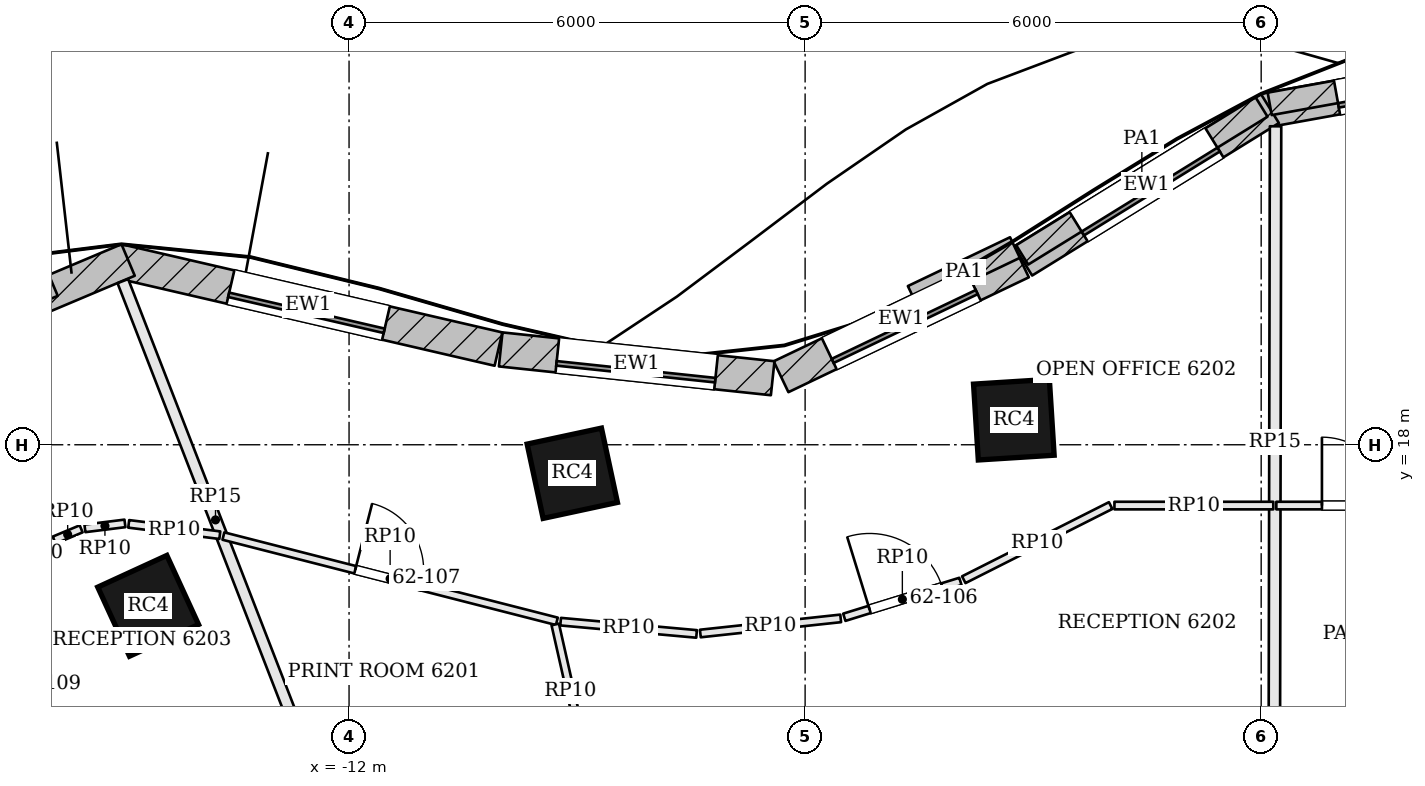
"""IFC4 building model, lengths in metres.
Left out: names, types, materials, properties, quantities, classifications, styles, units other than length and angle.
Written with IfcOpenShell. Run it as: python <this file> out.ifc"""

import sys

from ifc_helpers import new_model, si_unit, direction, frame, frame_2d, origin, origin_2d, place, context, subcontext, project, spatial, rectangle, extrude, element, fill, save


model = new_model("IFC4")
c1 = context("Model", 3, precision=1e-05, world=origin(), true_north=direction((0.0, 1.0)))
c2 = subcontext(c1, "Body", "Model", "MODEL_VIEW")
j1 = project(units=[si_unit("LENGTHUNIT", "METRE"), si_unit("PLANEANGLEUNIT", "RADIAN")], contexts=[c1])
p1 = place(None, origin())
s1 = spatial("IfcSite", under=j1, at=p1, CompositionType="ELEMENT")
p2 = place(p1, origin())
s2 = spatial("IfcBuilding", under=s1, at=p2, CompositionType="ELEMENT")
p3 = place(p2, frame((0.0, 0.0, 252.6)))
s3 = spatial("IfcBuildingStorey", under=s2, at=p3, CompositionType="ELEMENT", Elevation=252.6)
for number, where, z_axis, x_axis in (
    (1, (-3.254, 18.33, 0.0), (0.0, 0.0, 1.0), (-0.998, -0.063, 0.0)),
    (2, (-9.063, 17.625, 0.0), (0.0, 0.0, 1.0), (-0.978, -0.21, 0.0)),
    (3, (-14.643, 15.881, 0.0), (0.0, 0.0, 1.0), (-0.909, -0.417, 0.0)),
):
    element("IfcColumn", number, at=place(p3, frame(where, z_axis=z_axis, x_axis=x_axis)), inside=s3, PredefinedType="COLUMN", context=c2, shape_type="SweptSolid", body=[
        extrude(rectangle(XDim=1.0, YDim=1.0, at=origin_2d()), origin(), (0.0, 0.0, 1.0), 3.9),
    ])
p4 = place(p3, frame((3.727, 23.061, 0.0), z_axis=(0.0, 0.0, 1.0), x_axis=(-0.984119180424, -0.177508982087, 0.0)))
e4 = element("IfcWall", 4, at=p4, inside=s3, PredefinedType="SOLIDWALL", context=c2, shape_type="SweptSolid", body=[
    extrude(rectangle(XDim=3.747, YDim=0.45, at=frame_2d((1.873, 0.0))), origin(), (0.0, 0.0, 1.0), 3.7),
])
p5 = place(p4, frame((0.973, 0.0, 0.9)))
e5 = element("IfcOpeningElement", 5, at=p5, cuts=e4, PredefinedType="OPENING", context=c2, shape_type="SweptSolid", body=[
    extrude(rectangle(XDim=1.8, YDim=2.3, at=frame_2d((0.9, 1.15))), frame((0.0, 0.235, 0.0), z_axis=(0.0, -1.0, 0.0), x_axis=(1.0, 0.0, 0.0)), (0.0, 0.0, 1.0), 0.47),
])
p6 = place(p3, frame((0.115, 22.424, 0.0), z_axis=(0.0, 0.0, 1.0), x_axis=(-0.8506970368, -0.525656305564, 0.0)))
e6 = element("IfcWall", 6, at=p6, inside=s3, PredefinedType="SOLIDWALL", context=c2, shape_type="SweptSolid", body=[
    extrude(rectangle(XDim=3.816, YDim=0.45, at=frame_2d((1.908, 0.0))), origin(), (0.0, 0.0, 1.0), 3.7),
])
p7 = place(p6, frame((0.858, 0.0, 0.9)))
e7 = element("IfcOpeningElement", 7, at=p7, cuts=e6, PredefinedType="OPENING", context=c2, shape_type="SweptSolid", body=[
    extrude(rectangle(XDim=2.1, YDim=2.3, at=frame_2d((1.05, 1.15))), frame((0.0, 0.235, 0.0), z_axis=(0.0, -1.0, 0.0), x_axis=(1.0, 0.0, 0.0)), (0.0, 0.0, 1.0), 0.47),
])
p8 = place(p3, frame((-3.154, 20.406, 0.0), z_axis=(0.0, 0.0, 1.0), x_axis=(-0.902333313, -0.431038968367, 0.0)))
e8 = element("IfcWall", 8, at=p8, inside=s3, PredefinedType="SOLIDWALL", context=c2, shape_type="SweptSolid", body=[
    extrude(rectangle(XDim=3.505, YDim=0.45, at=frame_2d((1.753, 0.0))), origin(), (0.0, 0.0, 1.0), 3.7),
])
p9 = place(p8, frame((0.703, 0.0, 0.9)))
e9 = element("IfcOpeningElement", 9, at=p9, cuts=e8, PredefinedType="OPENING", context=c2, shape_type="SweptSolid", body=[
    extrude(rectangle(XDim=2.1, YDim=2.3, at=frame_2d((1.05, 1.15))), frame((0.0, 0.235, 0.0), z_axis=(0.0, -1.0, 0.0), x_axis=(1.0, 0.0, 0.0)), (0.0, 0.0, 1.0), 0.47),
])
p10 = place(p3, frame((-6.427, 18.875, 0.0), z_axis=(0.0, 0.0, 1.0), x_axis=(-0.994433468803, 0.10536638992, 0.0)))
e10 = element("IfcWall", 10, at=p10, inside=s3, PredefinedType="SOLIDWALL", context=c2, shape_type="SweptSolid", body=[
    extrude(rectangle(XDim=3.598, YDim=0.45, at=frame_2d((1.799, 0.0))), origin(), (0.0, 0.0, 1.0), 3.7),
])
p11 = place(p10, frame((0.749, 0.0, 0.9)))
e11 = element("IfcOpeningElement", 11, at=p11, cuts=e10, PredefinedType="OPENING", context=c2, shape_type="SweptSolid", body=[
    extrude(rectangle(XDim=2.1, YDim=2.3, at=frame_2d((1.05, 1.15))), frame((0.0, 0.235, 0.0), z_axis=(0.0, -1.0, 0.0), x_axis=(1.0, 0.0, 0.0)), (0.0, 0.0, 1.0), 0.47),
])
p12 = place(p3, frame((-10.034, 19.259, 0.0), z_axis=(0.0, 0.0, 1.0), x_axis=(-0.974223567844, 0.225584662283, 0.0)))
e12 = element("IfcWall", 12, at=p12, inside=s3, PredefinedType="SOLIDWALL", context=c2, shape_type="SweptSolid", body=[
    extrude(rectangle(XDim=5.139, YDim=0.45, at=frame_2d((2.569, 0.0))), origin(), (0.0, 0.0, 1.0), 3.7),
])
p13 = place(p12, frame((1.519, 0.0, 0.9)))
e13 = element("IfcOpeningElement", 13, at=p13, cuts=e12, PredefinedType="OPENING", context=c2, shape_type="SweptSolid", body=[
    extrude(rectangle(XDim=2.1, YDim=2.3, at=frame_2d((1.05, 1.15))), frame((0.0, 0.235, 0.0), z_axis=(0.0, -1.0, 0.0), x_axis=(1.0, 0.0, 0.0)), (0.0, 0.0, 1.0), 0.47),
])
p14 = place(p3, frame((-14.906, 20.431, 0.0), z_axis=(0.0, 0.0, 1.0), x_axis=(-0.921435803521, -0.388530642279, 0.0)))
e14 = element("IfcWall", 14, at=p14, inside=s3, PredefinedType="SOLIDWALL", context=c2, shape_type="SweptSolid", body=[
    extrude(rectangle(XDim=4.309, YDim=0.45, at=frame_2d((2.154, 0.0))), origin(), (0.0, 0.0, 1.0), 3.7),
])
p15 = place(p14, frame((1.254, 0.0, 0.9)))
e15 = element("IfcOpeningElement", 15, at=p15, cuts=e14, PredefinedType="OPENING", context=c2, shape_type="SweptSolid", body=[
    extrude(rectangle(XDim=1.8, YDim=2.3, at=frame_2d((0.9, 1.15))), frame((0.0, 0.235, 0.0), z_axis=(0.0, -1.0, 0.0), x_axis=(1.0, 0.0, 0.0)), (0.0, 0.0, 1.0), 0.47),
])
p16 = place(p3, frame((3.59, 23.112, 3.9), z_axis=(0.0, 0.0, 1.0), x_axis=(-0.984124248147, -0.177480884064, 0.0)))
e16 = element("IfcWall", 16, at=p16, inside=s3, PredefinedType="PARAPET", context=c2, shape_type="SweptSolid", body=[
    extrude(rectangle(XDim=3.534, YDim=0.3, at=frame_2d((1.767, 0.0))), origin(), (0.0, 0.0, 1.0), 1.1),
])
p17 = place(p3, frame((0.005, 22.444, 3.9), z_axis=(0.0, 0.0, 1.0), x_axis=(-0.850710394144, -0.525634688063, 0.0)))
e17 = element("IfcWall", 17, at=p17, inside=s3, PredefinedType="PARAPET", context=c2, shape_type="SweptSolid", body=[
    extrude(rectangle(XDim=3.702, YDim=0.3, at=frame_2d((1.851, 0.0))), origin(), (0.0, 0.0, 1.0), 1.1),
])
p18 = place(p3, frame((-3.239, 20.594, 3.9), z_axis=(0.0, 0.0, 1.0), x_axis=(-0.902344893923, -0.431014724123, 0.0)))
e18 = element("IfcWall", 18, at=p18, inside=s3, PredefinedType="PARAPET", context=c2, shape_type="SweptSolid", body=[
    extrude(rectangle(XDim=1.49, YDim=0.3, at=frame_2d((0.745, 0.0))), origin(), (0.0, 0.0, 1.0), 1.1),
])
p19 = place(p3, frame((-15.891, 20.097, 3.9), z_axis=(0.0, 0.0, 1.0), x_axis=(-0.921468908678, -0.388452121038, 0.0)))
e19 = element("IfcWall", 19, at=p19, inside=s3, PredefinedType="PARAPET", context=c2, shape_type="SweptSolid", body=[
    extrude(rectangle(XDim=2.099, YDim=0.3, at=frame_2d((1.05, 0.0))), origin(), (0.0, 0.0, 1.0), 1.1),
])
p20 = place(p3, frame((0.189, 22.19, 0.0), z_axis=(0.0, 0.0, 1.0), x_axis=(-0.001967286324, -0.99999806489, 0.0)))
e20 = element("IfcWall", 20, at=p20, inside=s3, PredefinedType="PARTITIONING", context=c2, shape_type="SweptSolid", body=[
    extrude(rectangle(XDim=8.315, YDim=0.15, at=frame_2d((4.157, 0.0))), origin(), (0.0, 0.0, 1.0), 3.084),
])
p21 = place(p3, frame((-14.976, 20.153, 0.0), z_axis=(0.0, 0.0, 1.0), x_axis=(0.361720652029, -0.932286527788, 0.0)))
e21 = element("IfcWall", 21, at=p21, inside=s3, PredefinedType="PARTITIONING", context=c2, shape_type="SweptSolid", body=[
    extrude(rectangle(XDim=6.739, YDim=0.15, at=frame_2d((3.37, 0.0))), origin(), (0.0, 0.0, 1.0), 3.084),
])
p22 = place(p3, frame((0.199, 17.2, 0.0), z_axis=(0.0, 0.0, 1.0), x_axis=(1.0, 0.0, 0.0)))
e22 = element("IfcWall", 22, at=p22, inside=s3, PredefinedType="PARTITIONING", context=c2, shape_type="SweptSolid", body=[
    extrude(rectangle(XDim=6.586, YDim=0.1, at=frame_2d((3.293, 0.0))), origin(), (0.0, 0.0, 1.0), 3.084),
])
p23 = place(p22, frame((0.6, 0.0, 0.0)))
e23 = element("IfcOpeningElement", 23, at=p23, cuts=e22, PredefinedType="OPENING", context=c2, shape_type="SweptSolid", body=[
    extrude(rectangle(XDim=0.9, YDim=2.1, at=frame_2d((0.45, 1.05))), frame((0.0, 0.06, 0.0), z_axis=(0.0, -1.0, 0.0), x_axis=(1.0, 0.0, 0.0)), (0.0, 0.0, 1.0), 0.12),
])
p24 = place(p3, frame((-13.653, 16.799, 0.0), z_axis=(0.0, 0.0, 1.0), x_axis=(0.968837918763, -0.247695553386, 0.0)))
e24 = element("IfcWall", 24, at=p24, inside=s3, PredefinedType="PARTITIONING", context=c2, shape_type="SweptSolid", body=[
    extrude(rectangle(XDim=4.528, YDim=0.1, at=frame_2d((2.264, 0.0))), origin(), (0.0, 0.0, 1.0), 3.084),
])
p25 = place(p24, frame((1.79, 0.0, 0.0)))
e25 = element("IfcOpeningElement", 25, at=p25, cuts=e24, PredefinedType="OPENING", context=c2, shape_type="SweptSolid", body=[
    extrude(rectangle(XDim=0.9, YDim=2.1, at=frame_2d((0.45, 1.05))), frame((0.0, 0.06, 0.0), z_axis=(0.0, -1.0, 0.0), x_axis=(1.0, 0.0, 0.0)), (0.0, 0.0, 1.0), 0.12),
])
p26 = place(p3, frame((-9.216, 15.673, 0.0), z_axis=(0.0, 0.0, 1.0), x_axis=(0.995953168248, -0.089873726172, 0.0)))
e26 = element("IfcWall", 26, at=p26, inside=s3, PredefinedType="PARTITIONING", context=c2, shape_type="SweptSolid", body=[
    extrude(rectangle(XDim=1.796, YDim=0.1, at=frame_2d((0.898, 0.0))), origin(), (0.0, 0.0, 1.0), 3.084),
])
p27 = place(p3, frame((-7.378, 15.517, 0.0), z_axis=(0.0, 0.0, 1.0), x_axis=(0.994229805258, 0.107271125359, 0.0)))
e27 = element("IfcWall", 27, at=p27, inside=s3, PredefinedType="PARTITIONING", context=c2, shape_type="SweptSolid", body=[
    extrude(rectangle(XDim=1.857, YDim=0.1, at=frame_2d((0.929, 0.0))), origin(), (0.0, 0.0, 1.0), 3.084),
])
p28 = place(p3, frame((-5.484, 15.73, 0.0), z_axis=(0.0, 0.0, 1.0), x_axis=(0.955448083824, 0.295159209778, 0.0)))
e28 = element("IfcWall", 28, at=p28, inside=s3, PredefinedType="PARTITIONING", context=c2, shape_type="SweptSolid", body=[
    extrude(rectangle(XDim=1.598, YDim=0.1, at=frame_2d((0.799, 0.0))), origin(), (0.0, 0.0, 1.0), 3.084),
])
p29 = place(p28, frame((0.348, 0.0, 0.0)))
e29 = element("IfcOpeningElement", 29, at=p29, cuts=e28, PredefinedType="OPENING", context=c2, shape_type="SweptSolid", body=[
    extrude(rectangle(XDim=1.0, YDim=2.1, at=frame_2d((0.5, 1.05))), frame((0.0, 0.06, 0.0), z_axis=(0.0, -1.0, 0.0), x_axis=(1.0, 0.0, 0.0)), (0.0, 0.0, 1.0), 0.12),
])
p30 = place(p3, frame((-3.913, 16.225, 0.0), z_axis=(0.0, 0.0, 1.0), x_axis=(0.892706044325, 0.450639455026, 0.0)))
e30 = element("IfcWall", 30, at=p30, inside=s3, PredefinedType="PARTITIONING", context=c2, shape_type="SweptSolid", body=[
    extrude(rectangle(XDim=2.164, YDim=0.1, at=frame_2d((1.082, 0.0))), origin(), (0.0, 0.0, 1.0), 3.084),
])
p31 = place(p3, frame((-1.93, 17.2, 0.0), z_axis=(0.0, 0.0, 1.0), x_axis=(1.0, 0.0, 0.0)))
e31 = element("IfcWall", 31, at=p31, inside=s3, PredefinedType="PARTITIONING", context=c2, shape_type="SweptSolid", body=[
    extrude(rectangle(XDim=2.09, YDim=0.1, at=frame_2d((1.045, 0.0))), origin(), (0.0, 0.0, 1.0), 3.084),
])
p32 = place(p3, frame((-8.889, 13.873, 0.0), z_axis=(0.0, 0.0, 1.0), x_axis=(-0.22037699084, 0.975414774293, 0.0)))
e32 = element("IfcWall", 32, at=p32, inside=s3, PredefinedType="PARTITIONING", context=c2, shape_type="SweptSolid", body=[
    extrude(rectangle(XDim=1.807, YDim=0.1, at=frame_2d((0.903, 0.0))), origin(), (0.0, 0.0, 1.0), 3.084),
])
p33 = place(p3, frame((-16.3, 16.424, 0.0), z_axis=(0.0, 0.0, 1.0), x_axis=(0.777836101026, 0.628467182867, 0.0)))
e33 = element("IfcWall", 33, at=p33, inside=s3, PredefinedType="PARTITIONING", context=c2, shape_type="SweptSolid", body=[
    extrude(rectangle(XDim=0.48, YDim=0.1, at=frame_2d((0.24, 0.0))), origin(), (0.0, 0.0, 1.0), 3.084),
])
p34 = place(p3, frame((-15.879, 16.746, 0.0), z_axis=(0.0, 0.0, 1.0), x_axis=(0.922945318828, 0.384931082732, 0.0)))
e34 = element("IfcWall", 34, at=p34, inside=s3, PredefinedType="PARTITIONING", context=c2, shape_type="SweptSolid", body=[
    extrude(rectangle(XDim=0.384, YDim=0.1, at=frame_2d((0.192, 0.0))), origin(), (0.0, 0.0, 1.0), 3.084),
])
p35 = place(p3, frame((-15.475, 16.9, 0.0), z_axis=(0.0, 0.0, 1.0), x_axis=(0.992369617548, 0.123298589477, 0.0)))
e35 = element("IfcWall", 35, at=p35, inside=s3, PredefinedType="PARTITIONING", context=c2, shape_type="SweptSolid", body=[
    extrude(rectangle(XDim=0.531, YDim=0.1, at=frame_2d((0.265, 0.0))), origin(), (0.0, 0.0, 1.0), 3.084),
])
p36 = place(p3, frame((-14.899, 16.959, 0.0), z_axis=(0.0, 0.0, 1.0), x_axis=(0.992389459051, -0.123138789846, 0.0)))
e36 = element("IfcWall", 36, at=p36, inside=s3, PredefinedType="PARTITIONING", context=c2, shape_type="SweptSolid", body=[
    extrude(rectangle(XDim=1.208, YDim=0.1, at=frame_2d((0.604, 0.0))), origin(), (0.0, 0.0, 1.0), 3.084),
])
p37 = place(p3, frame((-14.837, 11.988, 0.0), z_axis=(0.0, 0.0, 1.0), x_axis=(-0.495920621108, 0.868367858433, 0.0)))
e37 = element("IfcWall", 37, at=p37, inside=s3, PredefinedType="PARTITIONING", context=c2, shape_type="SweptSolid", body=[
    extrude(rectangle(XDim=4.095, YDim=0.1, at=frame_2d((2.047, 0.0))), origin(), (0.0, 0.0, 1.0), 3.084),
])
p38 = place(p37, frame((2.8, 0.0, 0.0)))
e38 = element("IfcOpeningElement", 38, at=p38, cuts=e37, PredefinedType="OPENING", context=c2, shape_type="SweptSolid", body=[
    extrude(rectangle(XDim=1.0, YDim=2.4, at=frame_2d((0.5, 1.2))), frame((0.0, 0.06, 0.0), z_axis=(0.0, -1.0, 0.0), x_axis=(1.0, 0.0, 0.0)), (0.0, 0.0, 1.0), 0.12),
])
p39 = place(p5, origin())
e39 = element("IfcWindow", 39, at=p39, inside=s3, PartitioningType="SINGLE_PANEL", PredefinedType="WINDOW", context=c2, shape_type="SweptSolid", body=[
    extrude(rectangle(XDim=1.8, YDim=2.3, at=frame_2d((0.9, 1.15))), frame((0.0, 0.135, 0.0), z_axis=(0.0, -1.0, 0.0), x_axis=(1.0, 0.0, 0.0)), (0.0, 0.0, 1.0), 0.06),
])
fill(e5, e39)
p40 = place(p7, origin())
e40 = element("IfcWindow", 40, at=p40, inside=s3, PartitioningType="SINGLE_PANEL", PredefinedType="WINDOW", context=c2, shape_type="SweptSolid", body=[
    extrude(rectangle(XDim=2.1, YDim=2.3, at=frame_2d((1.05, 1.15))), frame((0.0, 0.135, 0.0), z_axis=(0.0, -1.0, 0.0), x_axis=(1.0, 0.0, 0.0)), (0.0, 0.0, 1.0), 0.06),
])
fill(e7, e40)
p41 = place(p9, origin())
e41 = element("IfcWindow", 41, at=p41, inside=s3, PartitioningType="SINGLE_PANEL", PredefinedType="WINDOW", context=c2, shape_type="SweptSolid", body=[
    extrude(rectangle(XDim=2.1, YDim=2.3, at=frame_2d((1.05, 1.15))), frame((0.0, 0.135, 0.0), z_axis=(0.0, -1.0, 0.0), x_axis=(1.0, 0.0, 0.0)), (0.0, 0.0, 1.0), 0.06),
])
fill(e9, e41)
p42 = place(p11, origin())
e42 = element("IfcWindow", 42, at=p42, inside=s3, PartitioningType="SINGLE_PANEL", PredefinedType="WINDOW", context=c2, shape_type="SweptSolid", body=[
    extrude(rectangle(XDim=2.1, YDim=2.3, at=frame_2d((1.05, 1.15))), frame((0.0, 0.135, 0.0), z_axis=(0.0, -1.0, 0.0), x_axis=(1.0, 0.0, 0.0)), (0.0, 0.0, 1.0), 0.06),
])
fill(e11, e42)
p43 = place(p13, origin())
e43 = element("IfcWindow", 43, at=p43, inside=s3, PartitioningType="SINGLE_PANEL", PredefinedType="WINDOW", context=c2, shape_type="SweptSolid", body=[
    extrude(rectangle(XDim=2.1, YDim=2.3, at=frame_2d((1.05, 1.15))), frame((0.0, 0.135, 0.0), z_axis=(0.0, -1.0, 0.0), x_axis=(1.0, 0.0, 0.0)), (0.0, 0.0, 1.0), 0.06),
])
fill(e13, e43)
p44 = place(p23, origin())
e44 = element("IfcDoor", 44, at=p44, inside=s3, OperationType="SINGLE_SWING_LEFT", PredefinedType="DOOR", context=c2, shape_type="SweptSolid", body=[
    extrude(rectangle(XDim=0.9, YDim=2.1, at=frame_2d((0.45, 1.05))), frame((0.0, 0.025, 0.0), z_axis=(0.0, -1.0, 0.0), x_axis=(1.0, 0.0, 0.0)), (0.0, 0.0, 1.0), 0.05),
])
fill(e23, e44)
p45 = place(p29, origin())
e45 = element("IfcDoor", 45, at=p45, inside=s3, OperationType="SINGLE_SWING_LEFT", PredefinedType="DOOR", context=c2, shape_type="SweptSolid", body=[
    extrude(rectangle(XDim=1.0, YDim=2.1, at=frame_2d((0.5, 1.05))), frame((0.0, 0.025, 0.0), z_axis=(0.0, -1.0, 0.0), x_axis=(1.0, 0.0, 0.0)), (0.0, 0.0, 1.0), 0.05),
])
fill(e29, e45)
p46 = place(p25, origin())
e46 = element("IfcDoor", 46, at=p46, inside=s3, OperationType="SINGLE_SWING_LEFT", PredefinedType="DOOR", context=c2, shape_type="SweptSolid", body=[
    extrude(rectangle(XDim=0.9, YDim=2.1, at=frame_2d((0.45, 1.05))), frame((0.0, 0.025, 0.0), z_axis=(0.0, -1.0, 0.0), x_axis=(1.0, 0.0, 0.0)), (0.0, 0.0, 1.0), 0.05),
])
fill(e25, e46)
save(model, sys.argv[1])
